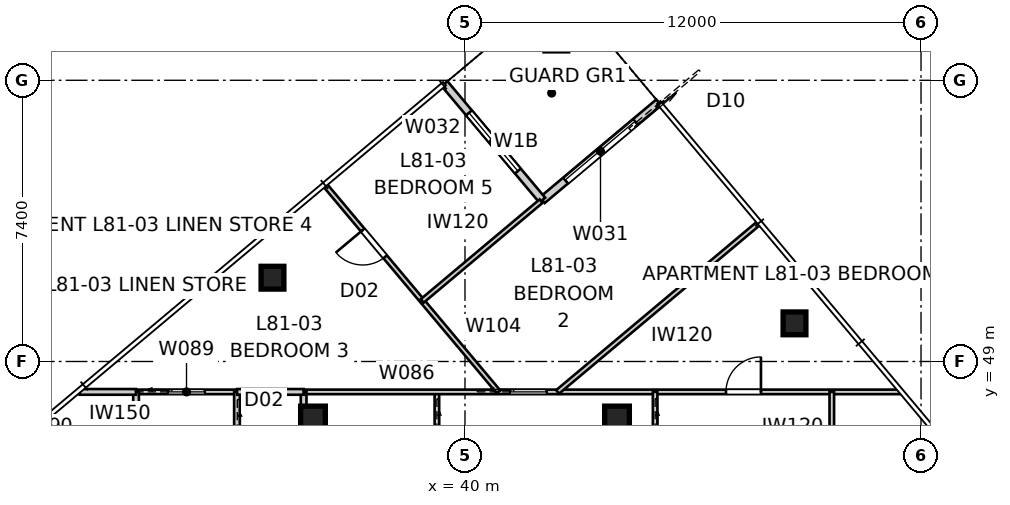
"""IFC4 building model, lengths in metres.
Left out: names, types, materials, properties, quantities, classifications, styles, units other than length and angle.
Written with IfcOpenShell. Run it as: python <this file> out.ifc"""

import sys

from ifc_helpers import new_model, si_unit, direction, frame, frame_2d, origin, origin_2d, place, context, subcontext, project, spatial, rectangle, extrude, element, fill, save


model = new_model("IFC4")
c1 = context("Model", 3, precision=1e-05, world=origin(), true_north=direction((0.0, 1.0)))
c2 = subcontext(c1, "Body", "Model", "MODEL_VIEW")
j1 = project(units=[si_unit("LENGTHUNIT", "METRE"), si_unit("PLANEANGLEUNIT", "RADIAN")], contexts=[c1])
p1 = place(None, origin())
s1 = spatial("IfcSite", under=j1, at=p1, CompositionType="ELEMENT")
p2 = place(p1, origin())
s2 = spatial("IfcBuilding", under=s1, at=p2, CompositionType="ELEMENT")
p3 = place(p2, frame((0.0, 0.0, 293.0)))
s3 = spatial("IfcBuildingStorey", under=s2, at=p3, CompositionType="ELEMENT", Elevation=293.0)
for number, where, z_axis, x_axis in (
    (1, (48.671, 50.003, 0.0), (0.0, 0.0, 1.0), (1.0, 0.0, 0.0)),
    (2, (34.935, 51.205, 0.0), (0.0, 0.0, 1.0), (1.0, 0.0, 0.0)),
):
    element("IfcColumn", number, at=place(p3, frame(where, z_axis=z_axis, x_axis=x_axis)), inside=s3, PredefinedType="COLUMN", context=c2, shape_type="SweptSolid", body=[
        extrude(rectangle(XDim=0.6, YDim=0.6, at=origin_2d()), origin(), (0.0, 0.0, 1.0), 3.4),
    ])
for number, where, z_axis, x_axis in (
    (3, (44.0, 47.5, 0.0), (0.0, 0.0, 1.0), (1.0, 0.0, 0.0)),
    (4, (36.0, 47.5, 0.0), (0.0, 0.0, 1.0), (1.0, 0.0, 0.0)),
):
    element("IfcColumn", number, at=place(p3, frame(where, z_axis=z_axis, x_axis=x_axis)), inside=s3, PredefinedType="COLUMN", context=c2, shape_type="SweptSolid", body=[
        extrude(rectangle(XDim=0.65, YDim=0.65, at=origin_2d()), origin(), (0.0, 0.0, 1.0), 3.4),
    ])
p4 = place(p3, frame((45.098, 55.817, 0.0), z_axis=(0.0, 0.0, 1.0), x_axis=(-0.766060656284, -0.642768287094, 0.0)))
e5 = element("IfcWall", 5, at=p4, inside=s3, PredefinedType="SOLIDWALL", context=c2, shape_type="SweptSolid", body=[
    extrude(rectangle(XDim=4.0, YDim=0.2, at=frame_2d((2.0, 0.0))), origin(), (0.0, 0.0, 1.0), 3.25),
])
p5 = place(p4, frame((0.8, 0.0, 0.0)))
e6 = element("IfcOpeningElement", 6, at=p5, cuts=e5, PredefinedType="OPENING", context=c2, shape_type="SweptSolid", body=[
    extrude(rectangle(XDim=2.4, YDim=2.4, at=frame_2d((1.2, 1.2))), frame((0.0, 0.11, 0.0), z_axis=(0.0, -1.0, 0.0), x_axis=(1.0, 0.0, 0.0)), (0.0, 0.0, 1.0), 0.22),
])
p6 = place(p3, frame((42.034, 53.246, 0.0), z_axis=(0.0, 0.0, 1.0), x_axis=(-0.642798342015, 0.766035437498, 0.0)))
e7 = element("IfcWall", 7, at=p6, inside=s3, PredefinedType="SOLIDWALL", context=c2, shape_type="SweptSolid", body=[
    extrude(rectangle(XDim=4.0, YDim=0.2, at=frame_2d((2.0, 0.0))), origin(), (0.0, 0.0, 1.0), 3.25),
])
p7 = place(p6, frame((1.0, 0.0, 0.45)))
e8 = element("IfcOpeningElement", 8, at=p7, cuts=e7, PredefinedType="OPENING", context=c2, shape_type="SweptSolid", body=[
    extrude(rectangle(XDim=2.0, YDim=1.8, at=frame_2d((1.0, 0.9))), frame((0.0, 0.11, 0.0), z_axis=(0.0, -1.0, 0.0), x_axis=(1.0, 0.0, 0.0)), (0.0, 0.0, 1.0), 0.22),
])
p8 = place(p3, frame((39.26, 48.2, 0.0), z_axis=(0.0, 0.0, 1.0), x_axis=(0.0, -1.0, 0.0)))
e9 = element("IfcWall", 9, at=p8, inside=s3, PredefinedType="PARTITIONING", context=c2, shape_type="SweptSolid", body=[
    extrude(rectangle(XDim=6.1, YDim=0.12, at=frame_2d((3.05, 0.0))), origin(), (0.0, 0.0, 1.0), 3.25),
])
p9 = place(p8, frame((4.095, 0.0, 0.0)))
e10 = element("IfcOpeningElement", 10, at=p9, cuts=e9, PredefinedType="OPENING", context=c2, shape_type="SweptSolid", body=[
    extrude(rectangle(XDim=0.96, YDim=2.1, at=frame_2d((0.48, 1.05))), frame((0.0, 0.07, 0.0), z_axis=(0.0, -1.0, 0.0), x_axis=(1.0, 0.0, 0.0)), (0.0, 0.0, 1.0), 0.14),
])
p10 = place(p8, frame((1.045, 0.0, 0.0)))
e11 = element("IfcOpeningElement", 11, at=p10, cuts=e9, PredefinedType="OPENING", context=c2, shape_type="SweptSolid", body=[
    extrude(rectangle(XDim=0.96, YDim=2.1, at=frame_2d((0.48, 1.05))), frame((0.0, 0.07, 0.0), z_axis=(0.0, -1.0, 0.0), x_axis=(1.0, 0.0, 0.0)), (0.0, 0.0, 1.0), 0.14),
])
p11 = place(p3, frame((35.754, 48.2, 0.0), z_axis=(0.0, 0.0, 1.0), x_axis=(1.0, 0.0, 0.0)))
e12 = element("IfcWall", 12, at=p11, inside=s3, PredefinedType="PARTITIONING", context=c2, shape_type="SweptSolid", body=[
    extrude(rectangle(XDim=15.683, YDim=0.12, at=frame_2d((7.842, 0.0))), origin(), (0.0, 0.0, 1.0), 3.25),
])
p12 = place(p11, frame((5.433, 0.0, 0.0)))
e13 = element("IfcOpeningElement", 13, at=p12, cuts=e12, PredefinedType="OPENING", context=c2, shape_type="SweptSolid", body=[
    extrude(rectangle(XDim=0.96, YDim=2.1, at=frame_2d((0.48, 1.05))), frame((0.0, 0.07, 0.0), z_axis=(0.0, -1.0, 0.0), x_axis=(1.0, 0.0, 0.0)), (0.0, 0.0, 1.0), 0.14),
])
p13 = place(p11, frame((11.114, 0.0, 0.0)))
e14 = element("IfcOpeningElement", 14, at=p13, cuts=e12, PredefinedType="OPENING", context=c2, shape_type="SweptSolid", body=[
    extrude(rectangle(XDim=0.92, YDim=2.34, at=frame_2d((0.46, 1.17))), frame((0.0, 0.07, 0.0), z_axis=(0.0, -1.0, 0.0), x_axis=(1.0, 0.0, 0.0)), (0.0, 0.0, 1.0), 0.14),
])
p14 = place(p3, frame((35.754, 45.15, 0.0), z_axis=(0.0, 0.0, 1.0), x_axis=(0.0, 1.0, 0.0)))
e15 = element("IfcWall", 15, at=p14, inside=s3, PredefinedType="SOLIDWALL", context=c2, shape_type="SweptSolid", body=[
    extrude(rectangle(XDim=3.05, YDim=0.15, at=frame_2d((1.525, 0.0))), origin(), (0.0, 0.0, 1.0), 3.25),
])
p15 = place(p14, frame((1.065, 0.0, 0.0)))
e16 = element("IfcOpeningElement", 16, at=p15, cuts=e15, PredefinedType="OPENING", context=c2, shape_type="SweptSolid", body=[
    extrude(rectangle(XDim=0.92, YDim=2.34, at=frame_2d((0.46, 1.17))), frame((0.0, 0.085, 0.0), z_axis=(0.0, -1.0, 0.0), x_axis=(1.0, 0.0, 0.0)), (0.0, 0.0, 1.0), 0.17),
])
p16 = place(p3, frame((31.344, 48.2, 0.0), z_axis=(0.0, 0.0, 1.0), x_axis=(1.0, 0.0, 0.0)))
e17 = element("IfcWall", 17, at=p16, inside=s3, PredefinedType="PARTITIONING", context=c2, shape_type="SweptSolid", body=[
    extrude(rectangle(XDim=2.656, YDim=0.12, at=frame_2d((1.328, 0.0))), origin(), (0.0, 0.0, 1.0), 3.25),
])
p17 = place(p16, frame((0.848, 0.0, 0.0)))
e18 = element("IfcOpeningElement", 18, at=p17, cuts=e17, PredefinedType="OPENING", context=c2, shape_type="SweptSolid", body=[
    extrude(rectangle(XDim=0.96, YDim=2.1, at=frame_2d((0.48, 1.05))), frame((0.0, 0.07, 0.0), z_axis=(0.0, -1.0, 0.0), x_axis=(1.0, 0.0, 0.0)), (0.0, 0.0, 1.0), 0.14),
])
p18 = place(p3, frame((31.344, 46.167, 0.0), z_axis=(0.0, 0.0, 1.0), x_axis=(0.0, 1.0, 0.0)))
e19 = element("IfcWall", 19, at=p18, inside=s3, PredefinedType="SOLIDWALL", context=c2, shape_type="SweptSolid", body=[
    extrude(rectangle(XDim=2.033, YDim=0.15, at=frame_2d((1.017, 0.0))), origin(), (0.0, 0.0, 1.0), 3.25),
])
p19 = place(p3, frame((34.0, 48.2, 0.0), z_axis=(0.0, 0.0, 1.0), x_axis=(0.0, -1.0, 0.0)))
e20 = element("IfcWall", 20, at=p19, inside=s3, PredefinedType="SOLIDWALL", context=c2, shape_type="SweptSolid", body=[
    extrude(rectangle(XDim=3.05, YDim=0.15, at=frame_2d((1.525, 0.0))), origin(), (0.0, 0.0, 1.0), 3.25),
])
p20 = place(p19, frame((1.07, 0.0, 0.0)))
e21 = element("IfcOpeningElement", 21, at=p20, cuts=e20, PredefinedType="OPENING", context=c2, shape_type="SweptSolid", body=[
    extrude(rectangle(XDim=0.96, YDim=2.1, at=frame_2d((0.48, 1.05))), frame((0.0, 0.085, 0.0), z_axis=(0.0, -1.0, 0.0), x_axis=(1.0, 0.0, 0.0)), (0.0, 0.0, 1.0), 0.17),
])
p21 = place(p3, frame((45.003, 48.2, 0.0), z_axis=(0.0, 0.0, 1.0), x_axis=(0.0, -1.0, 0.0)))
e22 = element("IfcWall", 22, at=p21, inside=s3, PredefinedType="PARTITIONING", context=c2, shape_type="SweptSolid", body=[
    extrude(rectangle(XDim=3.05, YDim=0.12, at=frame_2d((1.525, 0.0))), origin(), (0.0, 0.0, 1.0), 3.25),
])
p22 = place(p21, frame((1.045, 0.0, 0.0)))
e23 = element("IfcOpeningElement", 23, at=p22, cuts=e22, PredefinedType="OPENING", context=c2, shape_type="SweptSolid", body=[
    extrude(rectangle(XDim=0.96, YDim=2.1, at=frame_2d((0.48, 1.05))), frame((0.0, 0.07, 0.0), z_axis=(0.0, -1.0, 0.0), x_axis=(1.0, 0.0, 0.0)), (0.0, 0.0, 1.0), 0.14),
])
p23 = place(p3, frame((49.652, 45.1, 0.0), z_axis=(0.0, 0.0, 1.0), x_axis=(0.0, 1.0, 0.0)))
e24 = element("IfcWall", 24, at=p23, inside=s3, PredefinedType="PARTITIONING", context=c2, shape_type="SweptSolid", body=[
    extrude(rectangle(XDim=3.1, YDim=0.12, at=frame_2d((1.55, 0.0))), origin(), (0.0, 0.0, 1.0), 3.25),
])
p24 = place(p3, frame((40.883, 48.2, 0.0), z_axis=(0.0, 0.0, 1.0), x_axis=(-0.642790379821, 0.766042118691, 0.0)))
e25 = element("IfcWall", 25, at=p24, inside=s3, PredefinedType="PARTITIONING", context=c2, shape_type="SweptSolid", body=[
    extrude(rectangle(XDim=7.085, YDim=0.12, at=frame_2d((3.543, 0.0))), origin(), (0.0, 0.0, 1.0), 3.25),
])
p25 = place(p24, frame((4.64, 0.0, 0.0)))
e26 = element("IfcOpeningElement", 26, at=p25, cuts=e25, PredefinedType="OPENING", context=c2, shape_type="SweptSolid", body=[
    extrude(rectangle(XDim=0.92, YDim=2.34, at=frame_2d((0.46, 1.17))), frame((0.0, 0.07, 0.0), z_axis=(0.0, -1.0, 0.0), x_axis=(1.0, 0.0, 0.0)), (0.0, 0.0, 1.0), 0.14),
])
p26 = place(p3, frame((47.719, 52.631, 0.0), z_axis=(0.0, 0.0, 1.0), x_axis=(-0.766036842262, -0.642796667926, 0.0)))
e27 = element("IfcWall", 27, at=p26, inside=s3, PredefinedType="PARTITIONING", context=c2, shape_type="SweptSolid", body=[
    extrude(rectangle(XDim=6.894, YDim=0.12, at=frame_2d((3.447, 0.0))), origin(), (0.0, 0.0, 1.0), 3.25),
])
p27 = place(p3, frame((38.874, 50.594, 0.0), z_axis=(0.0, 0.0, 1.0), x_axis=(0.766061483953, 0.642767300664, 0.0)))
e28 = element("IfcWall", 28, at=p27, inside=s3, PredefinedType="PARTITIONING", context=c2, shape_type="SweptSolid", body=[
    extrude(rectangle(XDim=4.085, YDim=0.12, at=frame_2d((2.042, 0.0))), origin(), (0.0, 0.0, 1.0), 3.25),
])
p28 = place(p3, frame((31.344, 48.2, 0.0), z_axis=(0.0, 0.0, 1.0), x_axis=(-1.0, 0.0, 0.0)))
e29 = element("IfcWall", 29, at=p28, inside=s3, PredefinedType="SOLIDWALL", context=c2, shape_type="SweptSolid", body=[
    extrude(rectangle(XDim=1.484, YDim=0.15, at=frame_2d((0.742, 0.0))), origin(), (0.0, 0.0, 1.0), 3.25),
])
p29 = place(p3, frame((35.754, 48.2, 0.0), z_axis=(0.0, 0.0, 1.0), x_axis=(-1.0, 0.0, 0.0)))
e30 = element("IfcWall", 30, at=p29, inside=s3, PredefinedType="SOLIDWALL", context=c2, shape_type="SweptSolid", body=[
    extrude(rectangle(XDim=1.753, YDim=0.15, at=frame_2d((0.877, 0.0))), origin(), (0.0, 0.0, 1.0), 3.25),
])
p30 = place(p5, origin())
e31 = element("IfcDoor", 31, at=p30, inside=s3, OperationType="SLIDING_TO_LEFT", PredefinedType="DOOR", context=c2, shape_type="SweptSolid", body=[
    extrude(rectangle(XDim=2.4, YDim=2.4, at=frame_2d((1.2, 1.2))), frame((0.0, 0.025, 0.0), z_axis=(0.0, -1.0, 0.0), x_axis=(1.0, 0.0, 0.0)), (0.0, 0.0, 1.0), 0.05),
])
fill(e6, e31)
p31 = place(p7, origin())
e32 = element("IfcWindow", 32, at=p31, inside=s3, PartitioningType="SINGLE_PANEL", PredefinedType="WINDOW", context=c2, shape_type="SweptSolid", body=[
    extrude(rectangle(XDim=2.0, YDim=1.8, at=frame_2d((1.0, 0.9))), frame((0.0, 0.03, 0.0), z_axis=(0.0, -1.0, 0.0), x_axis=(1.0, 0.0, 0.0)), (0.0, 0.0, 1.0), 0.06),
])
fill(e8, e32)
p32 = place(p17, origin())
e33 = element("IfcDoor", 33, at=p32, inside=s3, OperationType="SLIDING_TO_LEFT", PredefinedType="DOOR", context=c2, shape_type="SweptSolid", body=[
    extrude(rectangle(XDim=0.96, YDim=2.1, at=frame_2d((0.48, 1.05))), frame((0.0, 0.025, 0.0), z_axis=(0.0, -1.0, 0.0), x_axis=(1.0, 0.0, 0.0)), (0.0, 0.0, 1.0), 0.05),
])
fill(e18, e33)
p33 = place(p12, origin())
e34 = element("IfcDoor", 34, at=p33, inside=s3, OperationType="SLIDING_TO_LEFT", PredefinedType="DOOR", context=c2, shape_type="SweptSolid", body=[
    extrude(rectangle(XDim=0.96, YDim=2.1, at=frame_2d((0.48, 1.05))), frame((0.0, 0.025, 0.0), z_axis=(0.0, -1.0, 0.0), x_axis=(1.0, 0.0, 0.0)), (0.0, 0.0, 1.0), 0.05),
])
fill(e13, e34)
p34 = place(p13, origin())
e35 = element("IfcDoor", 35, at=p34, inside=s3, OperationType="SINGLE_SWING_RIGHT", PredefinedType="DOOR", context=c2, shape_type="SweptSolid", body=[
    extrude(rectangle(XDim=0.92, YDim=2.34, at=frame_2d((0.46, 1.17))), frame((0.0, 0.025, 0.0), z_axis=(0.0, -1.0, 0.0), x_axis=(1.0, 0.0, 0.0)), (0.0, 0.0, 1.0), 0.05),
])
fill(e14, e35)
p35 = place(p25, origin())
e36 = element("IfcDoor", 36, at=p35, inside=s3, OperationType="SINGLE_SWING_RIGHT", PredefinedType="DOOR", context=c2, shape_type="SweptSolid", body=[
    extrude(rectangle(XDim=0.92, YDim=2.34, at=frame_2d((0.46, 1.17))), frame((0.0, 0.025, 0.0), z_axis=(0.0, -1.0, 0.0), x_axis=(1.0, 0.0, 0.0)), (0.0, 0.0, 1.0), 0.05),
])
fill(e26, e36)
save(model, sys.argv[1])
